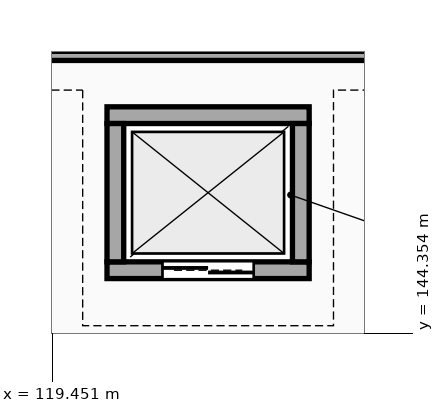
"""IFC4 building model, lengths in metres.
Left out: names, types, materials, properties, quantities, classifications, styles, units other than length and angle.
Written with IfcOpenShell. Run it as: python <this file> out.ifc"""

import sys

from ifc_helpers import new_model, si_unit, direction, frame, frame_2d, origin, place, context, subcontext, project, spatial, rectangle, extrude, element, fill, save


model = new_model("IFC4")
c1 = context("Model", 3, precision=1e-05, world=origin(), true_north=direction((0.0, 1.0)))
c2 = subcontext(c1, "Body", "Model", "MODEL_VIEW")
j1 = project(units=[si_unit("LENGTHUNIT", "METRE"), si_unit("PLANEANGLEUNIT", "RADIAN")], contexts=[c1])
p1 = place(None, origin())
s1 = spatial("IfcSite", under=j1, at=p1, CompositionType="ELEMENT")
p2 = place(p1, origin())
s2 = spatial("IfcBuilding", under=s1, at=p2, CompositionType="ELEMENT")
p3 = place(p2, frame((0.0, 0.0, 10.8)))
s3 = spatial("IfcBuildingStorey", under=s2, at=p3, CompositionType="ELEMENT", Elevation=10.8)
p4 = place(p3, frame((120.17, 145.18, 0.0), z_axis=(0.0, 0.0, 1.0), x_axis=(1.0, 0.0, 0.0)))
e1 = element("IfcWall", 1, at=p4, inside=s3, PredefinedType="STANDARD", context=c2, shape_type="SweptSolid", body=[
    extrude(rectangle(XDim=2.66, YDim=0.22, at=frame_2d((1.33, 0.0))), origin(), (0.0, 0.0, 1.0), 4.22),
])
p5 = place(p4, frame((0.73, 0.0, 0.0)))
e2 = element("IfcOpeningElement", 2, at=p5, cuts=e1, PredefinedType="OPENING", context=c2, shape_type="SweptSolid", body=[
    extrude(rectangle(XDim=1.2, YDim=2.2, at=frame_2d((0.6, 1.1))), frame((0.0, 0.12, 0.0), z_axis=(0.0, -1.0, 0.0), x_axis=(1.0, 0.0, 0.0)), (0.0, 0.0, 1.0), 0.24),
])
p6 = place(p3, frame((122.83, 147.22, 0.0), z_axis=(0.0, 0.0, 1.0), x_axis=(-1.0, 0.0, 0.0)))
e3 = element("IfcWall", 3, at=p6, inside=s3, PredefinedType="STANDARD", context=c2, shape_type="SweptSolid", body=[
    extrude(rectangle(XDim=2.66, YDim=0.22, at=frame_2d((1.33, 0.0))), origin(), (0.0, 0.0, 1.0), 4.22),
])
for number, where, z_axis, x_axis in (
    (4, (120.28, 147.11, 0.0), (0.0, 0.0, 1.0), (0.0, -1.0, 0.0)),
    (5, (122.72, 145.29, 0.0), (0.0, 0.0, 1.0), (0.0, 1.0, 0.0)),
):
    element("IfcWall", number, at=place(p3, frame(where, z_axis=z_axis, x_axis=x_axis)), inside=s3, PredefinedType="STANDARD", context=c2, shape_type="SweptSolid", body=[
        extrude(rectangle(XDim=1.82, YDim=0.22, at=frame_2d((0.91, 0.0))), origin(), (0.0, 0.0, 1.0), 4.22),
    ])
p7 = place(p3, frame((117.0, 148.0, 0.0), z_axis=(0.0, 0.0, 1.0), x_axis=(1.0, 0.0, 0.0)))
e6 = element("IfcWall", 6, at=p7, inside=s3, PredefinedType="PARTITIONING", context=c2, shape_type="SweptSolid", body=[
    extrude(rectangle(XDim=9.0, YDim=0.12, at=frame_2d((4.5, 0.0))), origin(), (0.0, 0.0, 1.0), 3.638),
])
p8 = place(p5, origin())
e7 = element("IfcDoor", 7, at=p8, inside=s3, OperationType="DOUBLE_DOOR_SLIDING", PredefinedType="DOOR", context=c2, shape_type="SweptSolid", body=[
    extrude(rectangle(XDim=1.2, YDim=2.2, at=frame_2d((0.6, 1.1))), frame((0.0, 0.025, 0.0), z_axis=(0.0, -1.0, 0.0), x_axis=(1.0, 0.0, 0.0)), (0.0, 0.0, 1.0), 0.05),
])
fill(e2, e7)
save(model, sys.argv[1])
